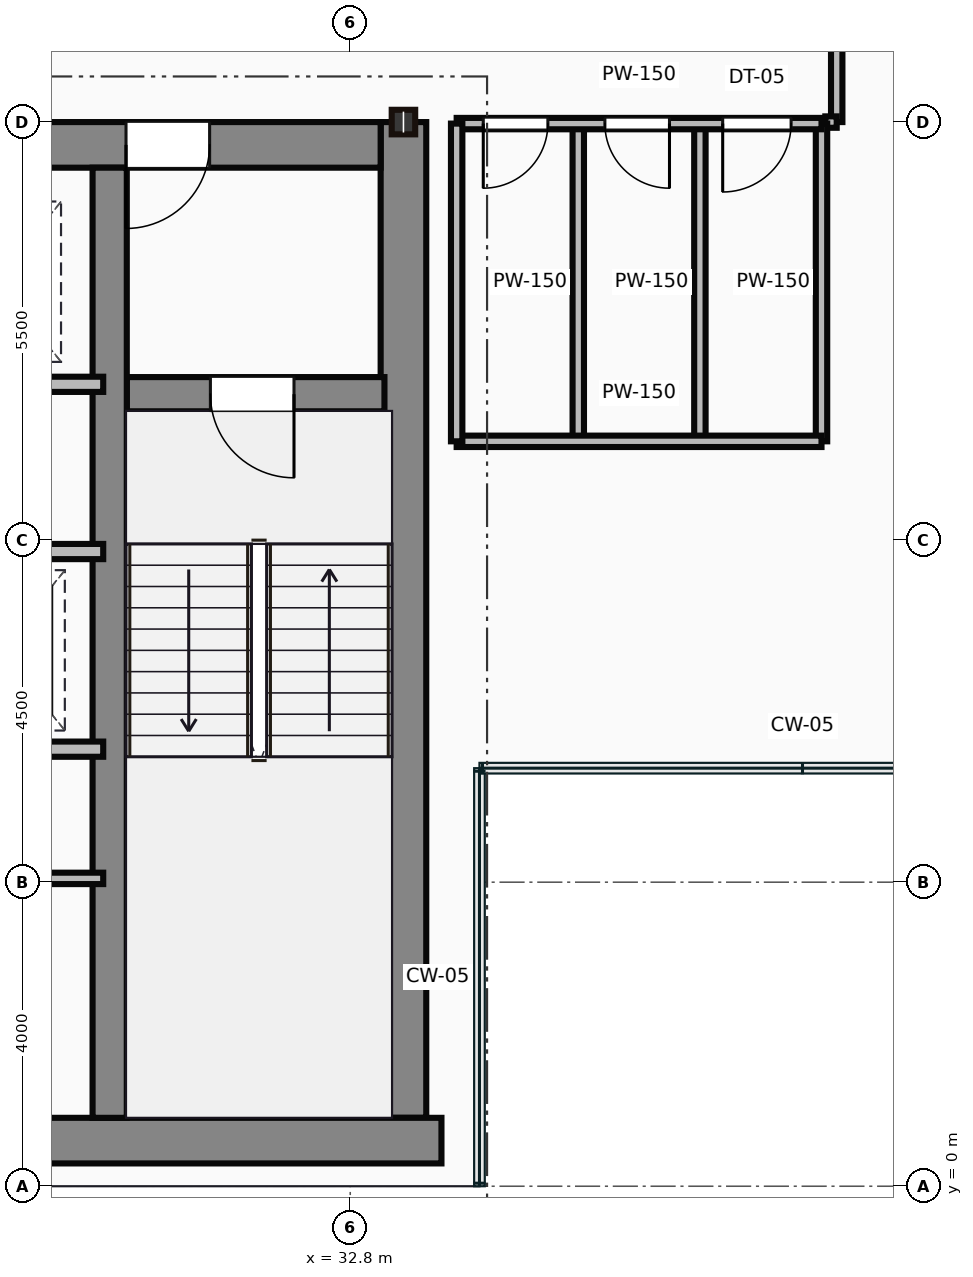
"""IFC4 building model, lengths in metres.
Left out: names, types, materials, properties, quantities, classifications, styles, units other than length and angle.
Written with IfcOpenShell. Run it as: python <this file> out.ifc"""

import sys

from ifc_helpers import new_model, si_unit, direction, frame, frame_2d, origin, origin_2d, place, context, subcontext, project, spatial, rectangle, i_section, extrude, source, transform, mapped, element, fill, save


model = new_model("IFC4")
c1 = context("Model", 3, precision=1e-05, world=origin(), true_north=direction((0.0, 1.0)))
c2 = subcontext(c1, "Body", "Model", "MODEL_VIEW")
j1 = project(units=[si_unit("LENGTHUNIT", "METRE"), si_unit("PLANEANGLEUNIT", "RADIAN")], contexts=[c1])
p1 = place(None, origin())
s1 = spatial("IfcSite", under=j1, at=p1, CompositionType="ELEMENT")
p2 = place(p1, origin())
s2 = spatial("IfcBuilding", under=s1, at=p2, CompositionType="ELEMENT")
p3 = place(p2, frame((0.0, 0.0, 195.9)))
s3 = spatial("IfcBuildingStorey", under=s2, at=p3, CompositionType="ELEMENT", Elevation=195.9)
m1 = source(origin(), c2, "Body", "SweptSolid", [
    extrude(rectangle(XDim=29.5, YDim=0.6, at=frame_2d((14.75, 0.0))), origin(), (0.0, 0.0, 1.0), 3.65),
])
p4 = place(p3, frame((4.5, 0.6, 0.0), z_axis=(0.0, 0.0, 1.0), x_axis=(1.0, 0.0, 0.0)))
e1 = element("IfcWall", 1, at=p4, inside=s3, PredefinedType="SHEAR", context=c2, shape_type="MappedRepresentation", body=[
    mapped(m1, transform((0.0, 0.0, 0.0))),
])
m2 = source(origin(), c2, "Body", "SweptSolid", [
    extrude(rectangle(XDim=13.1, YDim=0.6, at=frame_2d((6.55, 0.0))), origin(), (0.0, 0.0, 1.0), 3.65),
])
p5 = place(p3, frame((33.5, 0.9, 0.0), z_axis=(0.0, 0.0, 1.0), x_axis=(0.0, 1.0, 0.0)))
e2 = element("IfcWall", 2, at=p5, inside=s3, PredefinedType="SHEAR", context=c2, shape_type="MappedRepresentation", body=[
    mapped(m2, transform((0.0, 0.0, 0.0))),
])
m3 = source(origin(), c2, "Body", "SweptSolid", [
    extrude(rectangle(XDim=12.6, YDim=0.6, at=frame_2d((6.3, 0.0))), origin(), (0.0, 0.0, 1.0), 3.65),
])
p6 = place(p3, frame((20.6, 13.7, 0.0), z_axis=(0.0, 0.0, 1.0), x_axis=(1.0, 0.0, 0.0)))
e3 = element("IfcWall", 3, at=p6, inside=s3, PredefinedType="SHEAR", context=c2, shape_type="MappedRepresentation", body=[
    mapped(m3, transform((0.0, 0.0, 0.0))),
])
p7 = place(p6, frame((9.25, 0.0, 0.0)))
e4 = element("IfcOpeningElement", 4, at=p7, cuts=e3, PredefinedType="OPENING", context=c2, shape_type="SweptSolid", body=[
    extrude(rectangle(XDim=1.1, YDim=2.15, at=frame_2d((0.55, 1.075))), frame((0.0, 0.31, 0.0), z_axis=(0.0, -1.0, 0.0), x_axis=(1.0, 0.0, 0.0)), (0.0, 0.0, 1.0), 0.62),
])
m4 = source(origin(), c2, "Body", "SweptSolid", [
    extrude(rectangle(XDim=12.5, YDim=0.45, at=frame_2d((6.25, 0.0))), origin(), (0.0, 0.0, 1.0), 3.65),
])
p8 = place(p3, frame((29.635, 0.9, 0.0), z_axis=(0.0, 0.0, 1.0), x_axis=(0.0, 1.0, 0.0)))
e5 = element("IfcWall", 5, at=p8, inside=s3, PredefinedType="SHEAR", context=c2, shape_type="MappedRepresentation", body=[
    mapped(m4, transform((0.0, 0.0, 0.0))),
])
m5 = source(origin(), c2, "Body", "SweptSolid", [
    extrude(rectangle(XDim=3.39, YDim=0.45, at=frame_2d((1.695, 0.0))), origin(), (0.0, 0.0, 1.0), 3.65),
])
p9 = place(p3, frame((29.86, 10.42, 0.0), z_axis=(0.0, 0.0, 1.0), x_axis=(1.0, 0.0, 0.0)))
e6 = element("IfcWall", 6, at=p9, inside=s3, PredefinedType="SHEAR", context=c2, shape_type="MappedRepresentation", body=[
    mapped(m5, transform((0.0, 0.0, 0.0))),
])
p10 = place(p9, frame((1.1, 0.0, 0.0)))
e7 = element("IfcOpeningElement", 7, at=p10, cuts=e6, PredefinedType="OPENING", context=c2, shape_type="SweptSolid", body=[
    extrude(rectangle(XDim=1.1, YDim=2.15, at=frame_2d((0.55, 1.075))), frame((0.0, 0.235, 0.0), z_axis=(0.0, -1.0, 0.0), x_axis=(1.0, 0.0, 0.0)), (0.0, 0.0, 1.0), 0.47),
])
m6 = source(origin(), c2, "Body", "SweptSolid", [
    extrude(i_section(OverallWidth=0.309, OverallDepth=0.323, WebThickness=0.014, FlangeThickness=0.023, at=origin_2d()), origin(), (0.0, 0.0, 1.0), 3.65),
])
p11 = place(p3, frame((33.5, 14.0, 0.0), z_axis=(0.0, 0.0, 1.0), x_axis=(1.0, 0.0, 0.0)))
e8 = element("IfcColumn", 8, at=p11, inside=s3, PredefinedType="COLUMN", context=c2, shape_type="MappedRepresentation", body=[
    mapped(m6, transform((0.0, 0.0, 0.0))),
])
m7 = source(origin(), c2, "Body", "SweptSolid", [
    extrude(rectangle(XDim=8.8, YDim=0.2, at=frame_2d((4.4, 0.0))), origin(), (0.0, 0.0, 1.0), 3.4),
])
p12 = place(p3, frame((20.75, 10.55, 0.0), z_axis=(0.0, 0.0, 1.0), x_axis=(1.0, 0.0, 0.0)))
e9 = element("IfcWall", 9, at=p12, inside=s3, PredefinedType="PARTITIONING", context=c2, shape_type="MappedRepresentation", body=[
    mapped(m7, transform((0.0, 0.0, 0.0))),
])
p13 = place(p12, frame((0.5, 0.0, 0.0)))
e10 = element("IfcOpeningElement", 10, at=p13, cuts=e9, PredefinedType="OPENING", context=c2, shape_type="SweptSolid", body=[
    extrude(rectangle(XDim=1.05, YDim=2.15, at=frame_2d((0.525, 1.075))), frame((0.0, 0.11, 0.0), z_axis=(0.0, -1.0, 0.0), x_axis=(1.0, 0.0, 0.0)), (0.0, 0.0, 1.0), 0.22),
])
p14 = place(p12, frame((2.6, 0.0, 0.0)))
e11 = element("IfcOpeningElement", 11, at=p14, cuts=e9, PredefinedType="OPENING", context=c2, shape_type="SweptSolid", body=[
    extrude(rectangle(XDim=1.05, YDim=2.15, at=frame_2d((0.525, 1.075))), frame((0.0, 0.11, 0.0), z_axis=(0.0, -1.0, 0.0), x_axis=(1.0, 0.0, 0.0)), (0.0, 0.0, 1.0), 0.22),
])
p15 = place(p12, frame((4.7, 0.0, 0.0)))
e12 = element("IfcOpeningElement", 12, at=p15, cuts=e9, PredefinedType="OPENING", context=c2, shape_type="SweptSolid", body=[
    extrude(rectangle(XDim=1.05, YDim=2.15, at=frame_2d((0.525, 1.075))), frame((0.0, 0.11, 0.0), z_axis=(0.0, -1.0, 0.0), x_axis=(1.0, 0.0, 0.0)), (0.0, 0.0, 1.0), 0.22),
])
p16 = place(p12, frame((6.8, 0.0, 0.0)))
e13 = element("IfcOpeningElement", 13, at=p16, cuts=e9, PredefinedType="OPENING", context=c2, shape_type="SweptSolid", body=[
    extrude(rectangle(XDim=1.05, YDim=2.15, at=frame_2d((0.525, 1.075))), frame((0.0, 0.11, 0.0), z_axis=(0.0, -1.0, 0.0), x_axis=(1.0, 0.0, 0.0)), (0.0, 0.0, 1.0), 0.22),
])
m8 = source(origin(), c2, "Body", "SweptSolid", [
    extrude(rectangle(XDim=4.55, YDim=0.2, at=frame_2d((2.275, 0.0))), origin(), (0.0, 0.0, 1.0), 3.4),
])
p17 = place(p3, frame((25.0, 8.35, 0.0), z_axis=(0.0, 0.0, 1.0), x_axis=(1.0, 0.0, 0.0)))
e14 = element("IfcWall", 14, at=p17, inside=s3, PredefinedType="PARTITIONING", context=c2, shape_type="MappedRepresentation", body=[
    mapped(m8, transform((0.0, 0.0, 0.0))),
])
p18 = place(p17, frame((0.5, 0.0, 0.0)))
e15 = element("IfcOpeningElement", 15, at=p18, cuts=e14, PredefinedType="OPENING", context=c2, shape_type="SweptSolid", body=[
    extrude(rectangle(XDim=1.05, YDim=2.15, at=frame_2d((0.525, 1.075))), frame((0.0, 0.11, 0.0), z_axis=(0.0, -1.0, 0.0), x_axis=(1.0, 0.0, 0.0)), (0.0, 0.0, 1.0), 0.22),
])
p19 = place(p17, frame((2.6, 0.0, 0.0)))
e16 = element("IfcOpeningElement", 16, at=p19, cuts=e14, PredefinedType="OPENING", context=c2, shape_type="SweptSolid", body=[
    extrude(rectangle(XDim=1.05, YDim=2.15, at=frame_2d((0.525, 1.075))), frame((0.0, 0.11, 0.0), z_axis=(0.0, -1.0, 0.0), x_axis=(1.0, 0.0, 0.0)), (0.0, 0.0, 1.0), 0.22),
])
p20 = place(p3, frame((25.0, 5.75, 0.0), z_axis=(0.0, 0.0, 1.0), x_axis=(1.0, 0.0, 0.0)))
e17 = element("IfcWall", 17, at=p20, inside=s3, PredefinedType="PARTITIONING", context=c2, shape_type="MappedRepresentation", body=[
    mapped(m8, transform((0.0, 0.0, 0.0))),
])
m9 = source(origin(), c2, "Body", "SweptSolid", [
    extrude(rectangle(XDim=4.55, YDim=0.15, at=frame_2d((2.275, 0.0))), origin(), (0.0, 0.0, 1.0), 3.4),
])
p21 = place(p3, frame((25.0, 4.05, 0.0), z_axis=(0.0, 0.0, 1.0), x_axis=(1.0, 0.0, 0.0)))
e18 = element("IfcWall", 18, at=p21, inside=s3, PredefinedType="PARTITIONING", context=c2, shape_type="MappedRepresentation", body=[
    mapped(m9, transform((0.0, 0.0, 0.0))),
])
m10 = source(origin(), c2, "Body", "SweptSolid", [
    extrude(rectangle(XDim=4.8, YDim=0.15, at=frame_2d((2.4, 0.0))), origin(), (0.0, 0.0, 1.0), 2.787),
])
p22 = place(p3, frame((34.2, 13.98, 0.0), z_axis=(0.0, 0.0, 1.0), x_axis=(1.0, 0.0, 0.0)))
e19 = element("IfcWall", 19, at=p22, inside=s3, PredefinedType="PARTITIONING", context=c2, shape_type="MappedRepresentation", body=[
    mapped(m10, transform((0.0, 0.0, 0.0))),
])
p23 = place(p22, frame((0.35, 0.0, 0.0)))
e20 = element("IfcOpeningElement", 20, at=p23, cuts=e19, PredefinedType="OPENING", context=c2, shape_type="SweptSolid", body=[
    extrude(rectangle(XDim=0.85, YDim=2.1, at=frame_2d((0.425, 1.05))), frame((0.0, 0.085, 0.0), z_axis=(0.0, -1.0, 0.0), x_axis=(1.0, 0.0, 0.0)), (0.0, 0.0, 1.0), 0.17),
])
p24 = place(p22, frame((1.95, 0.0, 0.0)))
e21 = element("IfcOpeningElement", 21, at=p24, cuts=e19, PredefinedType="OPENING", context=c2, shape_type="SweptSolid", body=[
    extrude(rectangle(XDim=0.85, YDim=2.1, at=frame_2d((0.425, 1.05))), frame((0.0, 0.085, 0.0), z_axis=(0.0, -1.0, 0.0), x_axis=(1.0, 0.0, 0.0)), (0.0, 0.0, 1.0), 0.17),
])
p25 = place(p22, frame((3.5, 0.0, 0.0)))
e22 = element("IfcOpeningElement", 22, at=p25, cuts=e19, PredefinedType="OPENING", context=c2, shape_type="SweptSolid", body=[
    extrude(rectangle(XDim=0.9, YDim=2.1, at=frame_2d((0.45, 1.05))), frame((0.0, 0.085, 0.0), z_axis=(0.0, -1.0, 0.0), x_axis=(1.0, 0.0, 0.0)), (0.0, 0.0, 1.0), 0.17),
])
m11 = source(origin(), c2, "Body", "SweptSolid", [
    extrude(rectangle(XDim=4.8, YDim=0.15, at=frame_2d((2.4, 0.0))), origin(), (0.0, 0.0, 1.0), 3.4),
])
p26 = place(p3, frame((34.2, 9.8, 0.0), z_axis=(0.0, 0.0, 1.0), x_axis=(1.0, 0.0, 0.0)))
e23 = element("IfcWall", 23, at=p26, inside=s3, PredefinedType="PARTITIONING", context=c2, shape_type="MappedRepresentation", body=[
    mapped(m11, transform((0.0, 0.0, 0.0))),
])
m12 = source(origin(), c2, "Body", "SweptSolid", [
    extrude(rectangle(XDim=4.18, YDim=0.15, at=frame_2d((2.09, 0.0))), origin(), (0.0, 0.0, 1.0), 3.4),
])
for number, where, z_axis, x_axis in (
    (24, (39.0, 9.8, 0.0), (0.0, 0.0, 1.0), (0.0, 1.0, 0.0)),
    (25, (34.2, 9.8, 0.0), (0.0, 0.0, 1.0), (0.0, 1.0, 0.0)),
    (26, (35.8, 9.8, 0.0), (0.0, 0.0, 1.0), (0.0, 1.0, 0.0)),
    (27, (37.4, 9.8, 0.0), (0.0, 0.0, 1.0), (0.0, 1.0, 0.0)),
):
    element("IfcWall", number, at=place(p3, frame(where, z_axis=z_axis, x_axis=x_axis)), inside=s3, PredefinedType="PARTITIONING", context=c2, shape_type="MappedRepresentation", body=[
        mapped(m12, transform((0.0, 0.0, 0.0))),
    ])
m13 = source(origin(), c2, "Body", "SweptSolid", [
    extrude(rectangle(XDim=2.2, YDim=0.15, at=frame_2d((1.1, 0.0))), origin(), (0.0, 0.0, 1.0), 3.4),
])
p27 = place(p3, frame((39.2, 16.2, 0.0), z_axis=(0.0, 0.0, 1.0), x_axis=(0.0, -1.0, 0.0)))
e28 = element("IfcWall", 28, at=p27, inside=s3, PredefinedType="PARTITIONING", context=c2, shape_type="MappedRepresentation", body=[
    mapped(m13, transform((0.0, 0.0, 0.0))),
])
m14 = source(origin(), c2, "Body", "SweptSolid", [
    extrude(rectangle(XDim=0.15, YDim=0.15, at=frame_2d((0.075, 0.0))), origin(), (0.0, 0.0, 1.0), 3.4),
])
p28 = place(p3, frame((39.2, 14.0, 0.0), z_axis=(0.0, 0.0, 1.0), x_axis=(-1.0, 0.0, 0.0)))
e29 = element("IfcWall", 29, at=p28, inside=s3, PredefinedType="PARTITIONING", context=c2, shape_type="MappedRepresentation", body=[
    mapped(m14, transform((0.0, 0.0, 0.0))),
])
m15 = source(origin(), c2, "Body", "SweptSolid", [
    extrude(rectangle(XDim=1.1, YDim=2.15, at=frame_2d((0.55, 1.075))), frame((0.0, 0.025, 0.0), z_axis=(0.0, -1.0, 0.0), x_axis=(1.0, 0.0, 0.0)), (0.0, 0.0, 1.0), 0.05),
])
p29 = place(p10, frame((1.1, 0.0, 0.0), z_axis=(0.0, 0.0, 1.0), x_axis=(-1.0, 0.0, 0.0)))
e30 = element("IfcDoor", 30, at=p29, inside=s3, OperationType="SINGLE_SWING_RIGHT", PredefinedType="DOOR", context=c2, shape_type="MappedRepresentation", body=[
    mapped(m15, transform((0.0, 0.0, 0.0))),
])
fill(e7, e30)
p30 = place(p7, origin())
e31 = element("IfcDoor", 31, at=p30, inside=s3, OperationType="SINGLE_SWING_LEFT", PredefinedType="DOOR", context=c2, shape_type="MappedRepresentation", body=[
    mapped(m15, transform((0.0, 0.0, 0.0))),
])
fill(e4, e31)
m16 = source(origin(), c2, "Body", "SweptSolid", [
    extrude(rectangle(XDim=0.85, YDim=2.1, at=frame_2d((0.425, 1.05))), frame((0.0, 0.025, 0.0), z_axis=(0.0, -1.0, 0.0), x_axis=(1.0, 0.0, 0.0)), (0.0, 0.0, 1.0), 0.05),
])
p31 = place(p23, frame((0.85, 0.0, 0.0), z_axis=(0.0, 0.0, 1.0), x_axis=(-1.0, 0.0, 0.0)))
e32 = element("IfcDoor", 32, at=p31, inside=s3, OperationType="SINGLE_SWING_LEFT", PredefinedType="DOOR", context=c2, shape_type="MappedRepresentation", body=[
    mapped(m16, transform((0.0, 0.0, 0.0))),
])
fill(e20, e32)
p32 = place(p24, frame((0.85, 0.0, 0.0), z_axis=(0.0, 0.0, 1.0), x_axis=(-1.0, 0.0, 0.0)))
e33 = element("IfcDoor", 33, at=p32, inside=s3, OperationType="SINGLE_SWING_RIGHT", PredefinedType="DOOR", context=c2, shape_type="MappedRepresentation", body=[
    mapped(m16, transform((0.0, 0.0, 0.0))),
])
fill(e21, e33)
m17 = source(origin(), c2, "Body", "SweptSolid", [
    extrude(rectangle(XDim=0.9, YDim=2.1, at=frame_2d((0.45, 1.05))), frame((0.0, 0.025, 0.0), z_axis=(0.0, -1.0, 0.0), x_axis=(1.0, 0.0, 0.0)), (0.0, 0.0, 1.0), 0.05),
])
p33 = place(p25, frame((0.9, 0.0, 0.0), z_axis=(0.0, 0.0, 1.0), x_axis=(-1.0, 0.0, 0.0)))
e34 = element("IfcDoor", 34, at=p33, inside=s3, OperationType="SINGLE_SWING_LEFT", PredefinedType="DOOR", context=c2, shape_type="MappedRepresentation", body=[
    mapped(m17, transform((0.0, 0.0, 0.0))),
])
fill(e22, e34)
save(model, sys.argv[1])
